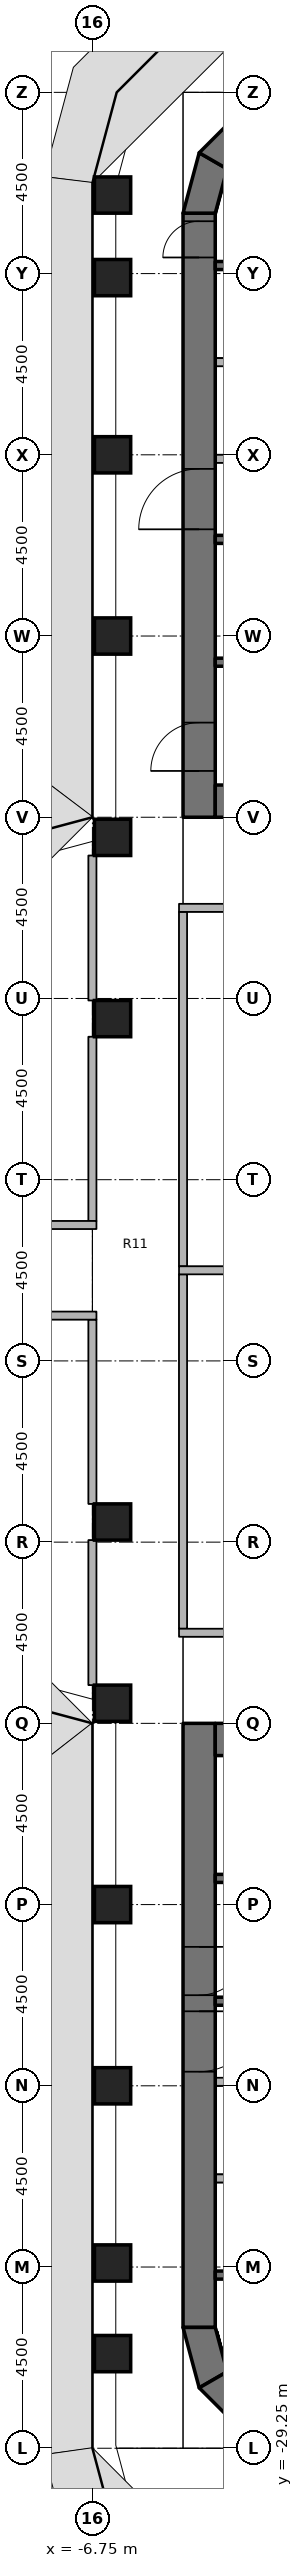
"""IFC4 building model, lengths in metres.
Left out: names, types, materials, properties, quantities, classifications, styles, units other than length and angle.
Written with IfcOpenShell. Run it as: python <this file> out.ifc"""

import sys

from ifc_helpers import new_model, si_unit, direction, frame, frame_2d, origin, origin_2d, place, context, subcontext, project, spatial, polyline, rectangle, outline, extrude, element, fill, save


model = new_model("IFC4")
c1 = context("Model", 3, precision=1e-05, world=origin(), true_north=direction((0.0, 1.0)))
c2 = subcontext(c1, "Body", "Model", "MODEL_VIEW")
j1 = project(units=[si_unit("LENGTHUNIT", "METRE"), si_unit("PLANEANGLEUNIT", "RADIAN")], contexts=[c1])
p1 = place(None, origin())
s1 = spatial("IfcSite", under=j1, at=p1, CompositionType="ELEMENT")
p2 = place(p1, origin())
s2 = spatial("IfcBuilding", under=s1, at=p2, CompositionType="ELEMENT")
p3 = place(p2, frame((0.0, 0.0, 117.0)))
s3 = spatial("IfcBuildingStorey", under=s2, at=p3, CompositionType="ELEMENT", Elevation=117.0)
for number, where, z_axis, x_axis in (
    (1, (-6.25, -26.9, 0.0), (0.0, 0.0, 1.0), (1.0, 0.0, 0.0)),
    (2, (-6.25, -24.65, 0.0), (0.0, 0.0, 1.0), (1.0, 0.0, 0.0)),
    (3, (-6.25, -20.25, 0.0), (0.0, 0.0, 1.0), (1.0, 0.0, 0.0)),
    (4, (-6.25, -15.75, 0.0), (0.0, 0.0, 1.0), (1.0, 0.0, 0.0)),
    (5, (-6.25, -10.75, 0.0), (0.0, 0.0, 1.0), (1.0, 0.0, 0.0)),
    (6, (-6.25, -6.25, 0.0), (0.0, 0.0, 1.0), (1.0, 0.0, 0.0)),
    (7, (-6.25, 6.25, 0.0), (0.0, 0.0, 1.0), (1.0, 0.0, 0.0)),
    (8, (-6.25, 10.75, 0.0), (0.0, 0.0, 1.0), (1.0, 0.0, 0.0)),
    (9, (-6.25, 15.75, 0.0), (0.0, 0.0, 1.0), (1.0, 0.0, 0.0)),
    (10, (-6.25, 20.25, 0.0), (0.0, 0.0, 1.0), (1.0, 0.0, 0.0)),
    (11, (-6.25, 24.65, 0.0), (0.0, 0.0, 1.0), (1.0, 0.0, 0.0)),
    (12, (-6.25, 26.7, 0.0), (0.0, 0.0, 1.0), (1.0, 0.0, 0.0)),
):
    element("IfcColumn", number, at=place(p3, frame(where, z_axis=z_axis, x_axis=x_axis)), inside=s3, PredefinedType="COLUMN", context=c2, shape_type="SweptSolid", body=[
        extrude(rectangle(XDim=0.9, YDim=0.9, at=origin_2d()), origin(), (0.0, 0.0, 1.0), 3.65),
    ])
p4 = place(p3, frame((-4.1, 11.25, 0.0), z_axis=(0.0, 0.0, 1.0), x_axis=(0.0, 1.0, 0.0)))
e13 = element("IfcWall", 13, at=p4, inside=s3, PredefinedType="SHEAR", context=c2, shape_type="SweptSolid", body=[
    extrude(rectangle(XDim=15.0, YDim=0.8, at=frame_2d((7.5, 0.0))), origin(), (0.0, 0.0, 1.0), 3.8),
])
p5 = place(p4, frame((7.15, 0.0, 0.0)))
e14 = element("IfcOpeningElement", 14, at=p5, cuts=e13, PredefinedType="OPENING", context=c2, shape_type="SweptSolid", body=[
    extrude(rectangle(XDim=1.5, YDim=2.3, at=frame_2d((0.75, 1.15))), frame((0.0, 0.41, 0.0), z_axis=(0.0, -1.0, 0.0), x_axis=(1.0, 0.0, 0.0)), (0.0, 0.0, 1.0), 0.82),
])
p6 = place(p4, frame((13.9, 0.0, 0.0)))
e15 = element("IfcOpeningElement", 15, at=p6, cuts=e13, PredefinedType="OPENING", context=c2, shape_type="SweptSolid", body=[
    extrude(rectangle(XDim=0.9, YDim=2.1, at=frame_2d((0.45, 1.05))), frame((0.0, 0.41, 0.0), z_axis=(0.0, -1.0, 0.0), x_axis=(1.0, 0.0, 0.0)), (0.0, 0.0, 1.0), 0.82),
])
p7 = place(p4, frame((1.15, 0.0, 0.0)))
e16 = element("IfcOpeningElement", 16, at=p7, cuts=e13, PredefinedType="OPENING", context=c2, shape_type="SweptSolid", body=[
    extrude(rectangle(XDim=1.2, YDim=2.1, at=frame_2d((0.6, 1.05))), frame((0.0, 0.41, 0.0), z_axis=(0.0, -1.0, 0.0), x_axis=(1.0, 0.0, 0.0)), (0.0, 0.0, 1.0), 0.82),
])
p8 = place(p3, frame((-3.7, 11.65, 0.0), z_axis=(0.0, 0.0, 1.0), x_axis=(1.0, 0.0, 0.0)))
e17 = element("IfcWall", 17, at=p8, inside=s3, PredefinedType="SHEAR", context=c2, shape_type="SweptSolid", body=[
    extrude(rectangle(XDim=7.4, YDim=0.8, at=frame_2d((3.7, 0.0))), origin(), (0.0, 0.0, 1.0), 3.8),
])
p9 = place(p3, origin())
e18 = element("IfcWall", 18, at=p9, inside=s3, PredefinedType="SHEAR", context=c2, shape_type="SweptSolid", body=[
    extrude(outline(polyline([(-4.5, 26.25), (-4.098, 27.75), (-3.405, 27.35), (-3.7, 26.25), (-4.5, 26.25)])), origin(), (0.0, 0.0, 1.0), 3.8),
])
p10 = place(p3, origin())
e19 = element("IfcWall", 19, at=p10, inside=s3, PredefinedType="SHEAR", context=c2, shape_type="SweptSolid", body=[
    extrude(outline(polyline([(-4.098, 27.75), (-3.0, 28.848), (-2.6, 28.155), (-3.405, 27.35), (-4.098, 27.75)])), origin(), (0.0, 0.0, 1.0), 3.8),
])
p11 = place(p3, frame((-4.1, -11.25, 0.0), z_axis=(0.0, 0.0, 1.0), x_axis=(0.0, -1.0, 0.0)))
e20 = element("IfcWall", 20, at=p11, inside=s3, PredefinedType="SHEAR", context=c2, shape_type="SweptSolid", body=[
    extrude(rectangle(XDim=15.0, YDim=0.8, at=frame_2d((7.5, 0.0))), origin(), (0.0, 0.0, 1.0), 3.8),
])
p12 = place(p11, frame((7.15, 0.0, 0.0)))
e21 = element("IfcOpeningElement", 21, at=p12, cuts=e20, PredefinedType="OPENING", context=c2, shape_type="SweptSolid", body=[
    extrude(rectangle(XDim=1.5, YDim=2.3, at=frame_2d((0.75, 1.15))), frame((0.0, 0.41, 0.0), z_axis=(0.0, -1.0, 0.0), x_axis=(1.0, 0.0, 0.0)), (0.0, 0.0, 1.0), 0.82),
])
p13 = place(p11, frame((5.55, 0.0, 0.0)))
e22 = element("IfcOpeningElement", 22, at=p13, cuts=e20, PredefinedType="OPENING", context=c2, shape_type="SweptSolid", body=[
    extrude(rectangle(XDim=1.2, YDim=2.1, at=frame_2d((0.6, 1.05))), frame((0.0, 0.41, 0.0), z_axis=(0.0, -1.0, 0.0), x_axis=(1.0, 0.0, 0.0)), (0.0, 0.0, 1.0), 0.82),
])
p14 = place(p3, frame((-3.7, -11.65, 0.0), z_axis=(0.0, 0.0, 1.0), x_axis=(1.0, 0.0, 0.0)))
e23 = element("IfcWall", 23, at=p14, inside=s3, PredefinedType="SHEAR", context=c2, shape_type="SweptSolid", body=[
    extrude(rectangle(XDim=7.4, YDim=0.8, at=frame_2d((3.7, 0.0))), origin(), (0.0, 0.0, 1.0), 3.8),
])
p15 = place(p3, origin())
e24 = element("IfcWall", 24, at=p15, inside=s3, PredefinedType="SHEAR", context=c2, shape_type="SweptSolid", body=[
    extrude(outline(polyline([(-4.5, -26.25), (-4.098, -27.75), (-3.405, -27.35), (-3.7, -26.25), (-4.5, -26.25)])), origin(), (0.0, 0.0, 1.0), 3.8),
])
p16 = place(p3, origin())
e25 = element("IfcWall", 25, at=p16, inside=s3, PredefinedType="SHEAR", context=c2, shape_type="SweptSolid", body=[
    extrude(outline(polyline([(-4.098, -27.75), (-3.0, -28.848), (-2.6, -28.155), (-3.405, -27.35), (-4.098, -27.75)])), origin(), (0.0, 0.0, 1.0), 3.8),
])
for number, where, z_axis, x_axis in (
    (26, (-3.7, 24.95, 0.0), (0.0, 0.0, 1.0), (1.0, 0.0, 0.0)),
    (27, (-3.7, 18.15, 0.0), (0.0, 0.0, 1.0), (1.0, 0.0, 0.0)),
    (28, (-3.7, 15.1, 0.0), (0.0, 0.0, 1.0), (1.0, 0.0, 0.0)),
):
    element("IfcWall", number, at=place(p3, frame(where, z_axis=z_axis, x_axis=x_axis)), inside=s3, PredefinedType="SHEAR", context=c2, shape_type="SweptSolid", body=[
        extrude(rectangle(XDim=7.4, YDim=0.2, at=frame_2d((3.7, 0.0))), origin(), (0.0, 0.0, 1.0), 3.65),
    ])
p17 = place(p3, frame((-3.7, 20.15, 0.0), z_axis=(0.0, 0.0, 1.0), x_axis=(1.0, 0.0, 0.0)))
e29 = element("IfcWall", 29, at=p17, inside=s3, PredefinedType="PARTITIONING", context=c2, shape_type="SweptSolid", body=[
    extrude(rectangle(XDim=2.8, YDim=0.2, at=frame_2d((1.4, 0.0))), origin(), (0.0, 0.0, 1.0), 3.65),
])
p18 = place(p3, frame((-3.7, 22.55, 0.0), z_axis=(0.0, 0.0, 1.0), x_axis=(1.0, 0.0, 0.0)))
e30 = element("IfcWall", 30, at=p18, inside=s3, PredefinedType="PARTITIONING", context=c2, shape_type="SweptSolid", body=[
    extrude(rectangle(XDim=2.6, YDim=0.2, at=frame_2d((1.3, 0.0))), origin(), (0.0, 0.0, 1.0), 3.65),
])
for number, where, z_axis, x_axis in (
    (31, (3.7, -24.95, 0.0), (0.0, 0.0, 1.0), (-1.0, 0.0, 0.0)),
    (32, (3.7, -18.15, 0.0), (0.0, 0.0, 1.0), (-1.0, 0.0, 0.0)),
    (33, (3.7, -15.1, 0.0), (0.0, 0.0, 1.0), (-1.0, 0.0, 0.0)),
):
    element("IfcWall", number, at=place(p3, frame(where, z_axis=z_axis, x_axis=x_axis)), inside=s3, PredefinedType="SHEAR", context=c2, shape_type="SweptSolid", body=[
        extrude(rectangle(XDim=7.4, YDim=0.2, at=frame_2d((3.7, 0.0))), origin(), (0.0, 0.0, 1.0), 3.65),
    ])
p19 = place(p3, frame((-0.9, -20.15, 0.0), z_axis=(0.0, 0.0, 1.0), x_axis=(-1.0, 0.0, 0.0)))
e34 = element("IfcWall", 34, at=p19, inside=s3, PredefinedType="PARTITIONING", context=c2, shape_type="SweptSolid", body=[
    extrude(rectangle(XDim=2.8, YDim=0.2, at=frame_2d((1.4, 0.0))), origin(), (0.0, 0.0, 1.0), 3.65),
])
p20 = place(p3, frame((-1.1, -22.55, 0.0), z_axis=(0.0, 0.0, 1.0), x_axis=(-1.0, 0.0, 0.0)))
e35 = element("IfcWall", 35, at=p20, inside=s3, PredefinedType="PARTITIONING", context=c2, shape_type="SweptSolid", body=[
    extrude(rectangle(XDim=2.6, YDim=0.2, at=frame_2d((1.3, 0.0))), origin(), (0.0, 0.0, 1.0), 3.65),
])
for number, where, z_axis, x_axis in (
    (36, (-4.5, 0.1, 0.0), (0.0, 0.0, 1.0), (0.0, 1.0, 0.0)),
    (37, (-4.5, -8.9, 0.0), (0.0, 0.0, 1.0), (0.0, 1.0, 0.0)),
):
    element("IfcWall", number, at=place(p3, frame(where, z_axis=z_axis, x_axis=x_axis)), inside=s3, PredefinedType="PARTITIONING", context=c2, shape_type="SweptSolid", body=[
        extrude(rectangle(XDim=8.8, YDim=0.2, at=frame_2d((4.4, 0.0))), origin(), (0.0, 0.0, 1.0), 2.738),
    ])
p21 = place(p3, frame((-6.75, 1.225, 0.0), z_axis=(0.0, 0.0, 1.0), x_axis=(0.0, 1.0, 0.0)))
e38 = element("IfcWall", 38, at=p21, inside=s3, PredefinedType="PARTITIONING", context=c2, shape_type="SweptSolid", body=[
    extrude(rectangle(XDim=4.575, YDim=0.2, at=frame_2d((2.288, 0.0))), origin(), (0.0, 0.0, 1.0), 2.738),
])
for number, where, z_axis, x_axis in (
    (39, (-6.75, 6.7, 0.0), (0.0, 0.0, 1.0), (0.0, 1.0, 0.0)),
    (40, (-6.75, -10.3, 0.0), (0.0, 0.0, 1.0), (0.0, 1.0, 0.0)),
):
    element("IfcWall", number, at=place(p3, frame(where, z_axis=z_axis, x_axis=x_axis)), inside=s3, PredefinedType="PARTITIONING", context=c2, shape_type="SweptSolid", body=[
        extrude(rectangle(XDim=3.6, YDim=0.2, at=frame_2d((1.8, 0.0))), origin(), (0.0, 0.0, 1.0), 2.738),
    ])
p22 = place(p3, frame((-6.75, -5.8, 0.0), z_axis=(0.0, 0.0, 1.0), x_axis=(0.0, 1.0, 0.0)))
e41 = element("IfcWall", 41, at=p22, inside=s3, PredefinedType="PARTITIONING", context=c2, shape_type="SweptSolid", body=[
    extrude(rectangle(XDim=4.575, YDim=0.2, at=frame_2d((2.288, 0.0))), origin(), (0.0, 0.0, 1.0), 2.738),
])
p23 = place(p3, frame((4.6, 9.0, 0.0), z_axis=(0.0, 0.0, 1.0), x_axis=(-1.0, 0.0, 0.0)))
e42 = element("IfcWall", 42, at=p23, inside=s3, PredefinedType="PARTITIONING", context=c2, shape_type="SweptSolid", body=[
    extrude(rectangle(XDim=9.2, YDim=0.2, at=frame_2d((4.6, 0.0))), origin(), (0.0, 0.0, 1.0), 2.738),
])
p24 = place(p23, frame((4.1, 0.0, 0.0)))
e43 = element("IfcOpeningElement", 43, at=p24, cuts=e42, PredefinedType="OPENING", context=c2, shape_type="SweptSolid", body=[
    extrude(rectangle(XDim=1.0, YDim=2.1, at=frame_2d((0.5, 1.05))), frame((0.0, 0.11, 0.0), z_axis=(0.0, -1.0, 0.0), x_axis=(1.0, 0.0, 0.0)), (0.0, 0.0, 1.0), 0.22),
])
p25 = place(p3, frame((-4.6, -9.0, 0.0), z_axis=(0.0, 0.0, 1.0), x_axis=(1.0, 0.0, 0.0)))
e44 = element("IfcWall", 44, at=p25, inside=s3, PredefinedType="PARTITIONING", context=c2, shape_type="SweptSolid", body=[
    extrude(rectangle(XDim=9.2, YDim=0.2, at=frame_2d((4.6, 0.0))), origin(), (0.0, 0.0, 1.0), 2.738),
])
p26 = place(p25, frame((4.1, 0.0, 0.0)))
e45 = element("IfcOpeningElement", 45, at=p26, cuts=e44, PredefinedType="OPENING", context=c2, shape_type="SweptSolid", body=[
    extrude(rectangle(XDim=1.0, YDim=2.1, at=frame_2d((0.5, 1.05))), frame((0.0, 0.11, 0.0), z_axis=(0.0, -1.0, 0.0), x_axis=(1.0, 0.0, 0.0)), (0.0, 0.0, 1.0), 0.22),
])
p27 = place(p3, frame((-4.6, 0.0, 0.0), z_axis=(0.0, 0.0, 1.0), x_axis=(1.0, 0.0, 0.0)))
e46 = element("IfcWall", 46, at=p27, inside=s3, PredefinedType="PARTITIONING", context=c2, shape_type="SweptSolid", body=[
    extrude(rectangle(XDim=9.2, YDim=0.2, at=frame_2d((4.6, 0.0))), origin(), (0.0, 0.0, 1.0), 2.738),
])
p28 = place(p3, frame((-11.35, 1.125, 0.0), z_axis=(0.0, 0.0, 1.0), x_axis=(1.0, 0.0, 0.0)))
e47 = element("IfcWall", 47, at=p28, inside=s3, PredefinedType="PARTITIONING", context=c2, shape_type="SweptSolid", body=[
    extrude(rectangle(XDim=4.7, YDim=0.2, at=frame_2d((2.35, 0.0))), origin(), (0.0, 0.0, 1.0), 2.738),
])
p29 = place(p28, frame((1.85, 0.0, 0.0)))
e48 = element("IfcOpeningElement", 48, at=p29, cuts=e47, PredefinedType="OPENING", context=c2, shape_type="SweptSolid", body=[
    extrude(rectangle(XDim=1.0, YDim=2.1, at=frame_2d((0.5, 1.05))), frame((0.0, 0.11, 0.0), z_axis=(0.0, -1.0, 0.0), x_axis=(1.0, 0.0, 0.0)), (0.0, 0.0, 1.0), 0.22),
])
p30 = place(p3, frame((-6.65, -1.125, 0.0), z_axis=(0.0, 0.0, 1.0), x_axis=(-1.0, 0.0, 0.0)))
e49 = element("IfcWall", 49, at=p30, inside=s3, PredefinedType="PARTITIONING", context=c2, shape_type="SweptSolid", body=[
    extrude(rectangle(XDim=4.7, YDim=0.2, at=frame_2d((2.35, 0.0))), origin(), (0.0, 0.0, 1.0), 2.738),
])
p31 = place(p30, frame((1.85, 0.0, 0.0)))
e50 = element("IfcOpeningElement", 50, at=p31, cuts=e49, PredefinedType="OPENING", context=c2, shape_type="SweptSolid", body=[
    extrude(rectangle(XDim=1.0, YDim=2.1, at=frame_2d((0.5, 1.05))), frame((0.0, 0.11, 0.0), z_axis=(0.0, -1.0, 0.0), x_axis=(1.0, 0.0, 0.0)), (0.0, 0.0, 1.0), 0.22),
])
p32 = place(p5, origin())
e51 = element("IfcDoor", 51, at=p32, inside=s3, OperationType="DOUBLE_DOOR_SINGLE_SWING", PredefinedType="DOOR", context=c2, shape_type="SweptSolid", body=[
    extrude(rectangle(XDim=1.5, YDim=2.3, at=frame_2d((0.75, 1.15))), frame((0.0, 0.025, 0.0), z_axis=(0.0, -1.0, 0.0), x_axis=(1.0, 0.0, 0.0)), (0.0, 0.0, 1.0), 0.05),
])
fill(e14, e51)
p33 = place(p6, origin())
e52 = element("IfcDoor", 52, at=p33, inside=s3, OperationType="SINGLE_SWING_RIGHT", PredefinedType="DOOR", context=c2, shape_type="SweptSolid", body=[
    extrude(rectangle(XDim=0.9, YDim=2.1, at=frame_2d((0.45, 1.05))), frame((0.0, 0.025, 0.0), z_axis=(0.0, -1.0, 0.0), x_axis=(1.0, 0.0, 0.0)), (0.0, 0.0, 1.0), 0.05),
])
fill(e15, e52)
p34 = place(p7, origin())
e53 = element("IfcDoor", 53, at=p34, inside=s3, OperationType="SINGLE_SWING_RIGHT", PredefinedType="DOOR", context=c2, shape_type="SweptSolid", body=[
    extrude(rectangle(XDim=1.2, YDim=2.1, at=frame_2d((0.6, 1.05))), frame((0.0, 0.025, 0.0), z_axis=(0.0, -1.0, 0.0), x_axis=(1.0, 0.0, 0.0)), (0.0, 0.0, 1.0), 0.05),
])
fill(e16, e53)
p35 = place(p12, origin())
e54 = element("IfcDoor", 54, at=p35, inside=s3, OperationType="DOUBLE_DOOR_SINGLE_SWING", PredefinedType="DOOR", context=c2, shape_type="SweptSolid", body=[
    extrude(rectangle(XDim=1.5, YDim=2.3, at=frame_2d((0.75, 1.15))), frame((0.0, 0.025, 0.0), z_axis=(0.0, -1.0, 0.0), x_axis=(1.0, 0.0, 0.0)), (0.0, 0.0, 1.0), 0.05),
])
fill(e21, e54)
p36 = place(p13, origin())
e55 = element("IfcDoor", 55, at=p36, inside=s3, OperationType="SINGLE_SWING_RIGHT", PredefinedType="DOOR", context=c2, shape_type="SweptSolid", body=[
    extrude(rectangle(XDim=1.2, YDim=2.1, at=frame_2d((0.6, 1.05))), frame((0.0, 0.025, 0.0), z_axis=(0.0, -1.0, 0.0), x_axis=(1.0, 0.0, 0.0)), (0.0, 0.0, 1.0), 0.05),
])
fill(e22, e55)
save(model, sys.argv[1])
